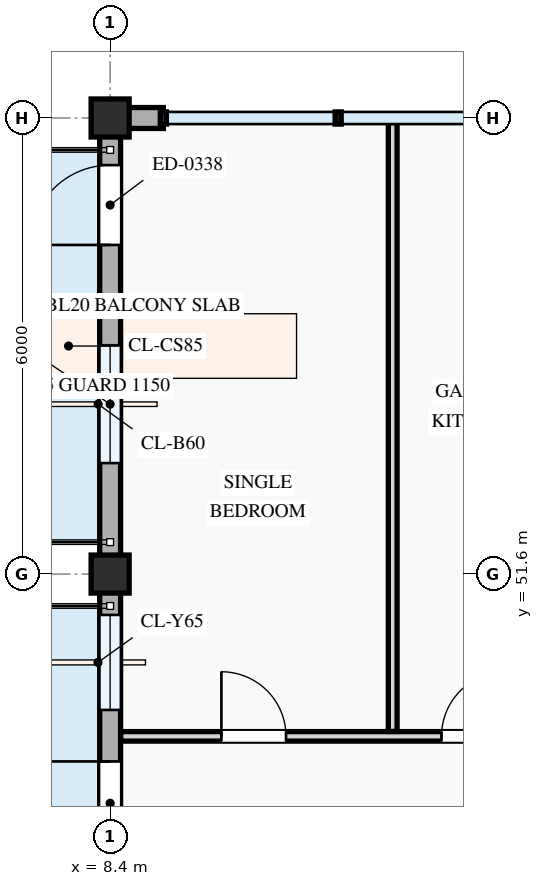
"""IFC4 building model, lengths in metres.
Left out: names, types, materials, properties, quantities, classifications, styles, units other than length and angle.
Written with IfcOpenShell. Run it as: python <this file> out.ifc"""

import sys

from ifc_helpers import new_model, si_unit, direction, frame, frame_2d, origin, origin_2d, place, context, subcontext, project, spatial, rectangle, extrude, element, fill, save


model = new_model("IFC4")
c1 = context("Model", 3, precision=1e-05, world=origin(), true_north=direction((0.0, 1.0)))
c2 = subcontext(c1, "Body", "Model", "MODEL_VIEW")
j1 = project(units=[si_unit("LENGTHUNIT", "METRE"), si_unit("PLANEANGLEUNIT", "RADIAN")], contexts=[c1])
p1 = place(None, origin())
s1 = spatial("IfcSite", under=j1, at=p1, CompositionType="ELEMENT")
p2 = place(p1, origin())
s2 = spatial("IfcBuilding", under=s1, at=p2, CompositionType="ELEMENT")
p3 = place(p2, frame((0.0, 0.0, 24.6)))
s3 = spatial("IfcBuildingStorey", under=s2, at=p3, CompositionType="ELEMENT", Elevation=24.6)
for number, where, z_axis, x_axis in (
    (1, (8.4, 51.6, 0.0), (0.0, 0.0, 1.0), (1.0, 0.0, 0.0)),
    (2, (8.4, 57.6, 0.0), (0.0, 0.0, 1.0), (1.0, 0.0, 0.0)),
):
    element("IfcColumn", number, at=place(p3, frame(where, z_axis=z_axis, x_axis=x_axis)), inside=s3, PredefinedType="COLUMN", context=c2, shape_type="SweptSolid", body=[
        extrude(rectangle(XDim=0.5, YDim=0.5, at=origin_2d()), origin(), (0.0, 0.0, 1.0), 3.3),
    ])
p4 = place(p3, frame((9.1, 57.6, 0.0), z_axis=(0.0, 0.0, 1.0), x_axis=(-1.0, 0.0, 0.0)))
e3 = element("IfcWall", 3, at=p4, inside=s3, PredefinedType="STANDARD", context=c2, shape_type="SweptSolid", body=[
    extrude(rectangle(XDim=0.561, YDim=0.275, at=frame_2d((0.28, 0.0))), origin(), (0.0, 0.0, 1.0), 2.475),
])
p5 = place(p3, frame((8.4, 57.6, 0.0), z_axis=(0.0, 0.0, 1.0), x_axis=(0.0, -1.0, 0.0)))
e4 = element("IfcWall", 4, at=p5, inside=s3, PredefinedType="STANDARD", context=c2, shape_type="SweptSolid", body=[
    extrude(rectangle(XDim=6.0, YDim=0.275, at=frame_2d((3.0, 0.0))), origin(), (0.0, 0.0, 1.0), 2.575),
])
p6 = place(p5, frame((0.62, 0.0, 0.0)))
e5 = element("IfcOpeningElement", 5, at=p6, cuts=e4, PredefinedType="OPENING", context=c2, shape_type="SweptSolid", body=[
    extrude(rectangle(XDim=1.05, YDim=2.15, at=frame_2d((0.525, 1.075))), frame((0.0, 0.147, 0.0), z_axis=(0.0, -1.0, 0.0), x_axis=(1.0, 0.0, 0.0)), (0.0, 0.0, 1.0), 0.295),
])
p7 = place(p5, frame((2.99, 0.0, 0.78)))
e6 = element("IfcOpeningElement", 6, at=p7, cuts=e4, PredefinedType="OPENING", context=c2, shape_type="SweptSolid", body=[
    extrude(rectangle(XDim=1.55, YDim=1.4, at=frame_2d((0.775, 0.7))), frame((0.0, 0.147, 0.0), z_axis=(0.0, -1.0, 0.0), x_axis=(1.0, 0.0, 0.0)), (0.0, 0.0, 1.0), 0.295),
])
p8 = place(p3, frame((8.4, 51.6, 0.0), z_axis=(0.0, 0.0, 1.0), x_axis=(0.0, -1.0, 0.0)))
e7 = element("IfcWall", 7, at=p8, inside=s3, PredefinedType="STANDARD", context=c2, shape_type="SweptSolid", body=[
    extrude(rectangle(XDim=8.4, YDim=0.275, at=frame_2d((4.2, 0.0))), origin(), (0.0, 0.0, 1.0), 2.425),
])
p9 = place(p8, frame((2.465, 0.0, 0.0)))
e8 = element("IfcOpeningElement", 8, at=p9, cuts=e7, PredefinedType="OPENING", context=c2, shape_type="SweptSolid", body=[
    extrude(rectangle(XDim=1.1, YDim=2.15, at=frame_2d((0.55, 1.075))), frame((0.0, 0.147, 0.0), z_axis=(0.0, -1.0, 0.0), x_axis=(1.0, 0.0, 0.0)), (0.0, 0.0, 1.0), 0.295),
])
p10 = place(p8, frame((0.538, 0.0, 0.78)))
e9 = element("IfcOpeningElement", 9, at=p10, cuts=e7, PredefinedType="OPENING", context=c2, shape_type="SweptSolid", body=[
    extrude(rectangle(XDim=1.25, YDim=1.3, at=frame_2d((0.625, 0.65))), frame((0.0, 0.147, 0.0), z_axis=(0.0, -1.0, 0.0), x_axis=(1.0, 0.0, 0.0)), (0.0, 0.0, 1.0), 0.295),
])
p11 = place(p8, frame((4.673, 0.0, 0.78)))
e10 = element("IfcOpeningElement", 10, at=p11, cuts=e7, PredefinedType="OPENING", context=c2, shape_type="SweptSolid", body=[
    extrude(rectangle(XDim=2.48, YDim=1.46, at=frame_2d((1.24, 0.73))), frame((0.0, 0.147, 0.0), z_axis=(0.0, -1.0, 0.0), x_axis=(1.0, 0.0, 0.0)), (0.0, 0.0, 1.0), 0.295),
])
p12 = place(p3, frame((8.54, 49.465, 0.0), z_axis=(0.0, 0.0, 1.0), x_axis=(1.0, 0.0, 0.0)))
e11 = element("IfcWall", 11, at=p12, inside=s3, PredefinedType="PARTITIONING", context=c2, shape_type="SweptSolid", body=[
    extrude(rectangle(XDim=7.463, YDim=0.125, at=frame_2d((3.732, 0.0))), origin(), (0.0, 0.0, 1.0), 3.0),
])
p13 = place(p12, frame((1.324, 0.0, 0.0)))
e12 = element("IfcOpeningElement", 12, at=p13, cuts=e11, PredefinedType="OPENING", context=c2, shape_type="SweptSolid", body=[
    extrude(rectangle(XDim=0.85, YDim=2.1, at=frame_2d((0.425, 1.05))), frame((0.0, 0.073, 0.0), z_axis=(0.0, -1.0, 0.0), x_axis=(1.0, 0.0, 0.0)), (0.0, 0.0, 1.0), 0.145),
])
p14 = place(p12, frame((4.22, 0.0, 0.0)))
e13 = element("IfcOpeningElement", 13, at=p14, cuts=e11, PredefinedType="OPENING", context=c2, shape_type="SweptSolid", body=[
    extrude(rectangle(XDim=0.85, YDim=2.1, at=frame_2d((0.425, 1.05))), frame((0.0, 0.073, 0.0), z_axis=(0.0, -1.0, 0.0), x_axis=(1.0, 0.0, 0.0)), (0.0, 0.0, 1.0), 0.145),
])
p15 = place(p12, frame((6.226, 0.0, 0.0)))
e14 = element("IfcOpeningElement", 14, at=p15, cuts=e11, PredefinedType="OPENING", context=c2, shape_type="SweptSolid", body=[
    extrude(rectangle(XDim=0.8, YDim=2.1, at=frame_2d((0.4, 1.05))), frame((0.0, 0.073, 0.0), z_axis=(0.0, -1.0, 0.0), x_axis=(1.0, 0.0, 0.0)), (0.0, 0.0, 1.0), 0.145),
])
p16 = place(p3, frame((12.118, 49.53, 0.0), z_axis=(0.0, 0.0, 1.0), x_axis=(0.0, 1.0, 0.0)))
e15 = element("IfcWall", 15, at=p16, inside=s3, PredefinedType="PARTITIONING", context=c2, shape_type="SweptSolid", body=[
    extrude(rectangle(XDim=8.01, YDim=0.115, at=frame_2d((4.005, 0.0))), origin(), (0.0, 0.0, 1.0), 3.0),
])
p17 = place(p6, frame((1.05, 0.0, 0.0), z_axis=(0.0, 0.0, 1.0), x_axis=(-1.0, 0.0, 0.0)))
e16 = element("IfcDoor", 16, at=p17, inside=s3, OperationType="SINGLE_SWING_LEFT", PredefinedType="DOOR", context=c2, shape_type="SweptSolid", body=[
    extrude(rectangle(XDim=1.05, YDim=2.15, at=frame_2d((0.525, 1.075))), frame((0.0, 0.025, 0.0), z_axis=(0.0, -1.0, 0.0), x_axis=(1.0, 0.0, 0.0)), (0.0, 0.0, 1.0), 0.05),
])
fill(e5, e16)
p18 = place(p7, origin())
e17 = element("IfcWindow", 17, at=p18, inside=s3, PartitioningType="SINGLE_PANEL", PredefinedType="WINDOW", context=c2, shape_type="SweptSolid", body=[
    extrude(rectangle(XDim=1.55, YDim=1.4, at=frame_2d((0.775, 0.7))), frame((0.0, 0.03, 0.0), z_axis=(0.0, -1.0, 0.0), x_axis=(1.0, 0.0, 0.0)), (0.0, 0.0, 1.0), 0.06),
])
fill(e6, e17)
p19 = place(p9, frame((1.1, 0.0, 0.0), z_axis=(0.0, 0.0, 1.0), x_axis=(-1.0, 0.0, 0.0)))
e18 = element("IfcDoor", 18, at=p19, inside=s3, OperationType="SINGLE_SWING_RIGHT", PredefinedType="DOOR", context=c2, shape_type="SweptSolid", body=[
    extrude(rectangle(XDim=1.1, YDim=2.15, at=frame_2d((0.55, 1.075))), frame((0.0, 0.025, 0.0), z_axis=(0.0, -1.0, 0.0), x_axis=(1.0, 0.0, 0.0)), (0.0, 0.0, 1.0), 0.05),
])
fill(e8, e18)
p20 = place(p10, origin())
e19 = element("IfcWindow", 19, at=p20, inside=s3, PartitioningType="SINGLE_PANEL", PredefinedType="WINDOW", context=c2, shape_type="SweptSolid", body=[
    extrude(rectangle(XDim=1.25, YDim=1.3, at=frame_2d((0.625, 0.65))), frame((0.0, 0.03, 0.0), z_axis=(0.0, -1.0, 0.0), x_axis=(1.0, 0.0, 0.0)), (0.0, 0.0, 1.0), 0.06),
])
fill(e9, e19)
p21 = place(p13, origin())
e20 = element("IfcDoor", 20, at=p21, inside=s3, OperationType="SINGLE_SWING_LEFT", PredefinedType="DOOR", context=c2, shape_type="SweptSolid", body=[
    extrude(rectangle(XDim=0.85, YDim=2.1, at=frame_2d((0.425, 1.05))), frame((0.0, 0.025, 0.0), z_axis=(0.0, -1.0, 0.0), x_axis=(1.0, 0.0, 0.0)), (0.0, 0.0, 1.0), 0.05),
])
fill(e12, e20)
p22 = place(p14, origin())
e21 = element("IfcDoor", 21, at=p22, inside=s3, OperationType="SINGLE_SWING_RIGHT", PredefinedType="DOOR", context=c2, shape_type="SweptSolid", body=[
    extrude(rectangle(XDim=0.85, YDim=2.1, at=frame_2d((0.425, 1.05))), frame((0.0, 0.025, 0.0), z_axis=(0.0, -1.0, 0.0), x_axis=(1.0, 0.0, 0.0)), (0.0, 0.0, 1.0), 0.05),
])
fill(e13, e21)
save(model, sys.argv[1])
